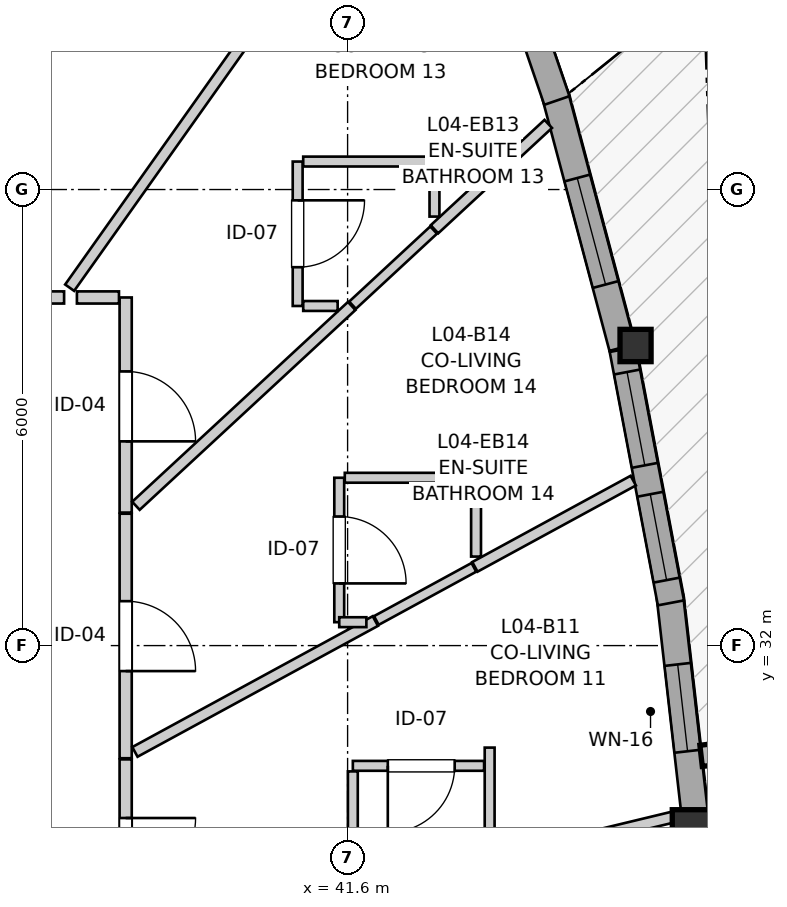
"""IFC4 building model, lengths in metres.
Left out: names, types, materials, properties, quantities, classifications, styles, units other than length and angle.
Written with IfcOpenShell. Run it as: python <this file> out.ifc"""

import sys

from ifc_helpers import new_model, si_unit, direction, frame, frame_2d, origin, origin_2d, place, context, subcontext, project, spatial, rectangle, i_section, extrude, source, transform, mapped, element, fill, save


model = new_model("IFC4")
c1 = context("Model", 3, precision=1e-05, world=origin(), true_north=direction((0.0, 1.0)))
c2 = subcontext(c1, "Body", "Model", "MODEL_VIEW")
j1 = project(units=[si_unit("LENGTHUNIT", "METRE"), si_unit("PLANEANGLEUNIT", "RADIAN")], contexts=[c1])
p1 = place(None, origin())
s1 = spatial("IfcSite", under=j1, at=p1, CompositionType="ELEMENT")
p2 = place(p1, origin())
s2 = spatial("IfcBuilding", under=s1, at=p2, CompositionType="ELEMENT")
p3 = place(p2, frame((0.0, 0.0, 17.4)))
s3 = spatial("IfcBuildingStorey", under=s2, at=p3, CompositionType="ELEMENT", Elevation=17.4)
m1 = source(origin(), c2, "Body", "SweptSolid", [
    extrude(rectangle(XDim=1.05, YDim=1.05, at=origin_2d()), origin(), (0.0, 0.0, 1.0), 2.94),
])
p4 = place(p3, frame((46.397, 29.316, 0.0), z_axis=(0.0, 0.0, 1.0), x_axis=(1.0, 0.0, 0.0)))
e1 = element("IfcColumn", 1, at=p4, inside=s3, PredefinedType="COLUMN", context=c2, shape_type="MappedRepresentation", body=[
    mapped(m1, transform((0.0, 0.0, 0.0), x_axis=(1.0, 0.0, 0.0), y_axis=(0.0, 1.0, 0.0), z_axis=(0.0, 0.0, 1.0), scale=1.0)),
])
m2 = source(origin(), c2, "Body", "SweptSolid", [
    extrude(i_section(OverallWidth=0.409, OverallDepth=0.425, WebThickness=0.03, FlangeThickness=0.048, FilletRadius=0.015, at=origin_2d()), origin(), (0.0, 0.0, 1.0), 2.94),
])
p5 = place(p3, frame((45.389, 35.948, 0.0), z_axis=(0.0, 0.0, 1.0), x_axis=(1.0, 0.0, 0.0)))
e2 = element("IfcColumn", 2, at=p5, inside=s3, PredefinedType="PILASTER", context=c2, shape_type="MappedRepresentation", body=[
    mapped(m2, transform((0.0, 0.0, 0.0), x_axis=(1.0, 0.0, 0.0), y_axis=(0.0, 1.0, 0.0), z_axis=(0.0, 0.0, 1.0), scale=1.0)),
])
p6 = place(p3, frame((46.189, 29.594, 0.0), z_axis=(0.0, 0.0, 1.0), x_axis=(-0.113201797404, 0.99357201705, 0.0)))
e3 = element("IfcWall", 3, at=p6, inside=s3, PredefinedType="SOLIDWALL", context=c2, shape_type="SweptSolid", body=[
    extrude(rectangle(XDim=3.075, YDim=0.35, at=frame_2d((1.538, 0.0))), origin(), (0.0, 0.0, 1.0), 2.42),
])
p7 = place(p6, frame((1.022, 0.0, 0.82)))
e4 = element("IfcOpeningElement", 4, at=p7, cuts=e3, PredefinedType="OPENING", context=c2, shape_type="SweptSolid", body=[
    extrude(rectangle(XDim=1.15, YDim=1.2, at=frame_2d((0.575, 0.6))), frame((0.0, 0.185, 0.0), z_axis=(0.0, -1.0, 0.0), x_axis=(1.0, 0.0, 0.0)), (0.0, 0.0, 1.0), 0.37),
])
p8 = place(p3, frame((45.854, 32.562, 0.0), z_axis=(0.0, 0.0, 1.0), x_axis=(-0.186698837055, 0.982417194598, 0.0)))
e5 = element("IfcWall", 5, at=p8, inside=s3, PredefinedType="SOLIDWALL", context=c2, shape_type="SweptSolid", body=[
    extrude(rectangle(XDim=3.393, YDim=0.35, at=frame_2d((1.697, 0.0))), origin(), (0.0, 0.0, 1.0), 2.42),
])
p9 = place(p8, frame((0.305, 0.0, 0.82)))
e6 = element("IfcOpeningElement", 6, at=p9, cuts=e5, PredefinedType="OPENING", context=c2, shape_type="SweptSolid", body=[
    extrude(rectangle(XDim=1.15, YDim=1.2, at=frame_2d((0.575, 0.6))), frame((0.0, 0.185, 0.0), z_axis=(0.0, -1.0, 0.0), x_axis=(1.0, 0.0, 0.0)), (0.0, 0.0, 1.0), 0.37),
])
p10 = place(p8, frame((1.842, 0.0, 0.82)))
e7 = element("IfcOpeningElement", 7, at=p10, cuts=e5, PredefinedType="OPENING", context=c2, shape_type="SweptSolid", body=[
    extrude(rectangle(XDim=1.25, YDim=1.35, at=frame_2d((0.625, 0.675))), frame((0.0, 0.185, 0.0), z_axis=(0.0, -1.0, 0.0), x_axis=(1.0, 0.0, 0.0)), (0.0, 0.0, 1.0), 0.37),
])
p11 = place(p3, frame((45.214, 35.922, 0.0), z_axis=(0.0, 0.0, 1.0), x_axis=(-0.257081073508, 0.966389839373, 0.0)))
e8 = element("IfcWall", 8, at=p11, inside=s3, PredefinedType="SOLIDWALL", context=c2, shape_type="SweptSolid", body=[
    extrude(rectangle(XDim=3.449, YDim=0.35, at=frame_2d((1.725, 0.0))), origin(), (0.0, 0.0, 1.0), 2.42),
])
p12 = place(p11, frame((0.857, 0.0, 0.82)))
e9 = element("IfcOpeningElement", 9, at=p12, cuts=e8, PredefinedType="OPENING", context=c2, shape_type="SweptSolid", body=[
    extrude(rectangle(XDim=1.45, YDim=1.25, at=frame_2d((0.725, 0.625))), frame((0.0, 0.185, 0.0), z_axis=(0.0, -1.0, 0.0), x_axis=(1.0, 0.0, 0.0)), (0.0, 0.0, 1.0), 0.37),
])
p13 = place(p3, frame((44.353, 39.171, 0.0), z_axis=(0.0, 0.0, 1.0), x_axis=(-0.323604310653, 0.946192501623, 0.0)))
e10 = element("IfcWall", 10, at=p13, inside=s3, PredefinedType="SOLIDWALL", context=c2, shape_type="SweptSolid", body=[
    extrude(rectangle(XDim=3.243, YDim=0.35, at=frame_2d((1.621, 0.0))), origin(), (0.0, 0.0, 1.0), 2.42),
])
p14 = place(p13, frame((0.901, 0.0, 0.82)))
e11 = element("IfcOpeningElement", 11, at=p14, cuts=e10, PredefinedType="OPENING", context=c2, shape_type="SweptSolid", body=[
    extrude(rectangle(XDim=1.45, YDim=1.25, at=frame_2d((0.725, 0.625))), frame((0.0, 0.185, 0.0), z_axis=(0.0, -1.0, 0.0), x_axis=(1.0, 0.0, 0.0)), (0.0, 0.0, 1.0), 0.37),
])
p15 = place(p3, frame((38.68, 33.735, 0.0), z_axis=(0.0, 0.0, 1.0), x_axis=(0.0, -1.0, 0.0)))
e12 = element("IfcWall", 12, at=p15, inside=s3, PredefinedType="PARTITIONING", context=c2, shape_type="SweptSolid", body=[
    extrude(rectangle(XDim=3.217, YDim=0.16, at=frame_2d((1.608, 0.0))), origin(), (0.0, 0.0, 1.0), 2.94),
])
p16 = place(p15, frame((1.15, 0.0, 0.0)))
e13 = element("IfcOpeningElement", 13, at=p16, cuts=e12, PredefinedType="OPENING", context=c2, shape_type="SweptSolid", body=[
    extrude(rectangle(XDim=0.92, YDim=2.1, at=frame_2d((0.46, 1.05))), frame((0.0, 0.09, 0.0), z_axis=(0.0, -1.0, 0.0), x_axis=(1.0, 0.0, 0.0)), (0.0, 0.0, 1.0), 0.18),
])
p17 = place(p3, frame((38.68, 36.58, 0.0), z_axis=(0.0, 0.0, 1.0), x_axis=(0.0, -1.0, 0.0)))
e14 = element("IfcWall", 14, at=p17, inside=s3, PredefinedType="PARTITIONING", context=c2, shape_type="SweptSolid", body=[
    extrude(rectangle(XDim=2.83, YDim=0.16, at=frame_2d((1.415, 0.0))), origin(), (0.0, 0.0, 1.0), 2.94),
])
p18 = place(p17, frame((0.973, 0.0, 0.0)))
e15 = element("IfcOpeningElement", 15, at=p18, cuts=e14, PredefinedType="OPENING", context=c2, shape_type="SweptSolid", body=[
    extrude(rectangle(XDim=0.92, YDim=2.1, at=frame_2d((0.46, 1.05))), frame((0.0, 0.09, 0.0), z_axis=(0.0, -1.0, 0.0), x_axis=(1.0, 0.0, 0.0)), (0.0, 0.0, 1.0), 0.18),
])
p19 = place(p3, frame((38.68, 30.503, 0.0), z_axis=(0.0, 0.0, 1.0), x_axis=(0.0, -1.0, 0.0)))
e16 = element("IfcWall", 16, at=p19, inside=s3, PredefinedType="PARTITIONING", context=c2, shape_type="SweptSolid", body=[
    extrude(rectangle(XDim=2.51, YDim=0.16, at=frame_2d((1.255, 0.0))), origin(), (0.0, 0.0, 1.0), 2.94),
])
p20 = place(p19, frame((0.771, 0.0, 0.0)))
e17 = element("IfcOpeningElement", 17, at=p20, cuts=e16, PredefinedType="OPENING", context=c2, shape_type="SweptSolid", body=[
    extrude(rectangle(XDim=0.92, YDim=2.1, at=frame_2d((0.46, 1.05))), frame((0.0, 0.09, 0.0), z_axis=(0.0, -1.0, 0.0), x_axis=(1.0, 0.0, 0.0)), (0.0, 0.0, 1.0), 0.18),
])
p21 = place(p3, frame((35.773, 36.58, 0.0), z_axis=(0.0, 0.0, 1.0), x_axis=(1.0, 0.0, 0.0)))
e18 = element("IfcWall", 18, at=p21, inside=s3, PredefinedType="PARTITIONING", context=c2, shape_type="SweptSolid", body=[
    extrude(rectangle(XDim=2.097, YDim=0.16, at=frame_2d((1.049, 0.0))), origin(), (0.0, 0.0, 1.0), 2.94),
])
p22 = place(p21, frame((0.588, 0.0, 0.0)))
e19 = element("IfcOpeningElement", 19, at=p22, cuts=e18, PredefinedType="OPENING", context=c2, shape_type="SweptSolid", body=[
    extrude(rectangle(XDim=0.92, YDim=2.1, at=frame_2d((0.46, 1.05))), frame((0.0, 0.09, 0.0), z_axis=(0.0, -1.0, 0.0), x_axis=(1.0, 0.0, 0.0)), (0.0, 0.0, 1.0), 0.18),
])
p23 = place(p3, frame((40.943, 38.368, 0.0), z_axis=(0.0, 0.0, 1.0), x_axis=(0.0, -1.0, 0.0)))
e20 = element("IfcWall", 20, at=p23, inside=s3, PredefinedType="PARTITIONING", context=c2, shape_type="SweptSolid", body=[
    extrude(rectangle(XDim=1.9, YDim=0.13, at=frame_2d((0.95, 0.0))), origin(), (0.0, 0.0, 1.0), 2.94),
])
p24 = place(p23, frame((0.51, 0.0, 0.0)))
e21 = element("IfcOpeningElement", 21, at=p24, cuts=e20, PredefinedType="OPENING", context=c2, shape_type="SweptSolid", body=[
    extrude(rectangle(XDim=0.88, YDim=2.05, at=frame_2d((0.44, 1.025))), frame((0.0, 0.075, 0.0), z_axis=(0.0, -1.0, 0.0), x_axis=(1.0, 0.0, 0.0)), (0.0, 0.0, 1.0), 0.15),
])
p25 = place(p3, frame((41.49, 34.208, 0.0), z_axis=(0.0, 0.0, 1.0), x_axis=(0.0, -1.0, 0.0)))
e22 = element("IfcWall", 22, at=p25, inside=s3, PredefinedType="PARTITIONING", context=c2, shape_type="SweptSolid", body=[
    extrude(rectangle(XDim=1.9, YDim=0.13, at=frame_2d((0.95, 0.0))), origin(), (0.0, 0.0, 1.0), 2.94),
])
p26 = place(p25, frame((0.51, 0.0, 0.0)))
e23 = element("IfcOpeningElement", 23, at=p26, cuts=e22, PredefinedType="OPENING", context=c2, shape_type="SweptSolid", body=[
    extrude(rectangle(XDim=0.88, YDim=2.05, at=frame_2d((0.44, 1.025))), frame((0.0, 0.075, 0.0), z_axis=(0.0, -1.0, 0.0), x_axis=(1.0, 0.0, 0.0)), (0.0, 0.0, 1.0), 0.15),
])
p27 = place(p3, frame((43.396, 30.418, 0.0), z_axis=(0.0, 0.0, 1.0), x_axis=(-1.0, 0.0, 0.0)))
e24 = element("IfcWall", 24, at=p27, inside=s3, PredefinedType="PARTITIONING", context=c2, shape_type="SweptSolid", body=[
    extrude(rectangle(XDim=1.727, YDim=0.13, at=frame_2d((0.864, 0.0))), origin(), (0.0, 0.0, 1.0), 2.94),
])
p28 = place(p27, frame((0.387, 0.0, 0.0)))
e25 = element("IfcOpeningElement", 25, at=p28, cuts=e24, PredefinedType="OPENING", context=c2, shape_type="SweptSolid", body=[
    extrude(rectangle(XDim=0.88, YDim=2.05, at=frame_2d((0.44, 1.025))), frame((0.0, 0.075, 0.0), z_axis=(0.0, -1.0, 0.0), x_axis=(1.0, 0.0, 0.0)), (0.0, 0.0, 1.0), 0.15),
])
p29 = place(p3, frame((34.219, 36.692, 0.0), z_axis=(0.0, 0.0, 1.0), x_axis=(0.340186046968, 0.940358151689, 0.0)))
e26 = element("IfcWall", 26, at=p29, inside=s3, PredefinedType="PARTITIONING", context=c2, shape_type="SweptSolid", body=[
    extrude(rectangle(XDim=11.951, YDim=0.145, at=frame_2d((5.976, 0.0))), origin(), (0.0, 0.0, 1.0), 2.94),
])
p30 = place(p3, frame((35.852, 36.7, 0.0), z_axis=(0.0, 0.0, 1.0), x_axis=(0.457258091214, 0.889334041865, 0.0)))
e27 = element("IfcWall", 27, at=p30, inside=s3, PredefinedType="PARTITIONING", context=c2, shape_type="SweptSolid", body=[
    extrude(rectangle(XDim=11.227, YDim=0.145, at=frame_2d((5.613, 0.0))), origin(), (0.0, 0.0, 1.0), 2.94),
])
p31 = place(p3, frame((37.943, 36.708, 0.0), z_axis=(0.0, 0.0, 1.0), x_axis=(0.578429476704, 0.81573239514, 0.0)))
e28 = element("IfcWall", 28, at=p31, inside=s3, PredefinedType="PARTITIONING", context=c2, shape_type="SweptSolid", body=[
    extrude(rectangle(XDim=8.447, YDim=0.145, at=frame_2d((4.223, 0.0))), origin(), (0.0, 0.0, 1.0), 2.94),
])
p32 = place(p3, frame((38.815, 33.839, 0.0), z_axis=(0.0, 0.0, 1.0), x_axis=(0.733718730688, 0.67945332749, 0.0)))
e29 = element("IfcWall", 29, at=p32, inside=s3, PredefinedType="PARTITIONING", context=c2, shape_type="SweptSolid", body=[
    extrude(rectangle(XDim=3.869, YDim=0.145, at=frame_2d((1.935, 0.0))), origin(), (0.0, 0.0, 1.0), 2.94),
])
p33 = place(p3, frame((38.802, 30.601, 0.0), z_axis=(0.0, 0.0, 1.0), x_axis=(0.878335610987, 0.478044510973, 0.0)))
e30 = element("IfcWall", 30, at=p33, inside=s3, PredefinedType="PARTITIONING", context=c2, shape_type="SweptSolid", body=[
    extrude(rectangle(XDim=3.602, YDim=0.145, at=frame_2d((1.801, 0.0))), origin(), (0.0, 0.0, 1.0), 2.94),
])
p34 = place(p3, frame((43.559, 29.184, 0.0), z_axis=(0.0, 0.0, 1.0), x_axis=(0.972124665715, 0.23446456941, 0.0)))
e31 = element("IfcWall", 31, at=p34, inside=s3, PredefinedType="PARTITIONING", context=c2, shape_type="SweptSolid", body=[
    extrude(rectangle(XDim=2.487, YDim=0.145, at=frame_2d((1.243, 0.0))), origin(), (0.0, 0.0, 1.0), 2.94),
])
p35 = place(p3, frame((43.275, 33.036, 0.0), z_axis=(0.0, 0.0, 1.0), x_axis=(0.878237509553, 0.478224713721, 0.0)))
e32 = element("IfcWall", 32, at=p35, inside=s3, PredefinedType="PARTITIONING", context=c2, shape_type="SweptSolid", body=[
    extrude(rectangle(XDim=2.372, YDim=0.145, at=frame_2d((1.186, 0.0))), origin(), (0.0, 0.0, 1.0), 2.94),
])
p36 = place(p3, frame((42.743, 37.477, 0.0), z_axis=(0.0, 0.0, 1.0), x_axis=(0.73374741774, 0.679422347999, 0.0)))
e33 = element("IfcWall", 33, at=p36, inside=s3, PredefinedType="PARTITIONING", context=c2, shape_type="SweptSolid", body=[
    extrude(rectangle(XDim=2.04, YDim=0.145, at=frame_2d((1.02, 0.0))), origin(), (0.0, 0.0, 1.0), 2.94),
])
p37 = place(p3, frame((41.016, 38.368, 0.0), z_axis=(0.0, 0.0, 1.0), x_axis=(1.0, 0.0, 0.0)))
e34 = element("IfcWall", 34, at=p37, inside=s3, PredefinedType="PARTITIONING", context=c2, shape_type="SweptSolid", body=[
    extrude(rectangle(XDim=1.727, YDim=0.13, at=frame_2d((0.863, 0.0))), origin(), (0.0, 0.0, 1.0), 2.94),
])
p38 = place(p3, frame((41.563, 34.208, 0.0), z_axis=(0.0, 0.0, 1.0), x_axis=(1.0, 0.0, 0.0)))
e35 = element("IfcWall", 35, at=p38, inside=s3, PredefinedType="PARTITIONING", context=c2, shape_type="SweptSolid", body=[
    extrude(rectangle(XDim=1.727, YDim=0.13, at=frame_2d((0.864, 0.0))), origin(), (0.0, 0.0, 1.0), 2.94),
])
p39 = place(p3, frame((41.669, 28.827, 0.0), z_axis=(0.0, 0.0, 1.0), x_axis=(0.0, 1.0, 0.0)))
e36 = element("IfcWall", 36, at=p39, inside=s3, PredefinedType="PARTITIONING", context=c2, shape_type="SweptSolid", body=[
    extrude(rectangle(XDim=1.518, YDim=0.13, at=frame_2d((0.759, 0.0))), origin(), (0.0, 0.0, 1.0), 2.94),
])
p40 = place(p3, frame((41.978, 32.33, 0.0), z_axis=(0.0, 0.0, 1.0), x_axis=(0.878138043068, 0.478407334097, 0.0)))
e37 = element("IfcWall", 37, at=p40, inside=s3, PredefinedType="PARTITIONING", context=c2, shape_type="SweptSolid", body=[
    extrude(rectangle(XDim=1.462, YDim=0.13, at=frame_2d((0.731, 0.0))), origin(), (0.0, 0.0, 1.0), 2.94),
])
p41 = place(p3, frame((41.665, 36.478, 0.0), z_axis=(0.0, 0.0, 1.0), x_axis=(0.733534386117, 0.679652340821, 0.0)))
e38 = element("IfcWall", 38, at=p41, inside=s3, PredefinedType="PARTITIONING", context=c2, shape_type="SweptSolid", body=[
    extrude(rectangle(XDim=1.454, YDim=0.13, at=frame_2d((0.727, 0.0))), origin(), (0.0, 0.0, 1.0), 2.94),
])
p42 = place(p3, frame((43.469, 28.922, 0.0), z_axis=(0.0, 0.0, 1.0), x_axis=(0.0, 1.0, 0.0)))
e39 = element("IfcWall", 39, at=p42, inside=s3, PredefinedType="PARTITIONING", context=c2, shape_type="SweptSolid", body=[
    extrude(rectangle(XDim=1.736, YDim=0.13, at=frame_2d((0.868, 0.0))), origin(), (0.0, 0.0, 1.0), 2.508),
])
p43 = place(p3, frame((43.29, 33.171, 0.0), z_axis=(0.0, 0.0, 1.0), x_axis=(0.0, 1.0, 0.0)))
e40 = element("IfcWall", 40, at=p43, inside=s3, PredefinedType="PARTITIONING", context=c2, shape_type="SweptSolid", body=[
    extrude(rectangle(XDim=0.964, YDim=0.13, at=frame_2d((0.482, 0.0))), origin(), (0.0, 0.0, 1.0), 2.94),
])
p44 = place(p3, frame((42.743, 37.644, 0.0), z_axis=(0.0, 0.0, 1.0), x_axis=(0.0, 1.0, 0.0)))
e41 = element("IfcWall", 41, at=p44, inside=s3, PredefinedType="PARTITIONING", context=c2, shape_type="SweptSolid", body=[
    extrude(rectangle(XDim=0.651, YDim=0.13, at=frame_2d((0.325, 0.0))), origin(), (0.0, 0.0, 1.0), 2.94),
])
p45 = place(p3, frame((38.039, 36.58, 0.0), z_axis=(0.0, 0.0, 1.0), x_axis=(1.0, 0.0, 0.0)))
e42 = element("IfcWall", 42, at=p45, inside=s3, PredefinedType="PARTITIONING", context=c2, shape_type="SweptSolid", body=[
    extrude(rectangle(XDim=0.553, YDim=0.16, at=frame_2d((0.277, 0.0))), origin(), (0.0, 0.0, 1.0), 2.94),
])
p46 = place(p3, frame((41.016, 36.468, 0.0), z_axis=(0.0, 0.0, 1.0), x_axis=(1.0, 0.0, 0.0)))
e43 = element("IfcWall", 43, at=p46, inside=s3, PredefinedType="PARTITIONING", context=c2, shape_type="SweptSolid", body=[
    extrude(rectangle(XDim=0.453, YDim=0.13, at=frame_2d((0.227, 0.0))), origin(), (0.0, 0.0, 1.0), 2.94),
])
p47 = place(p3, frame((41.49, 32.308, 0.0), z_axis=(0.0, 0.0, 1.0), x_axis=(1.0, 0.0, 0.0)))
e44 = element("IfcWall", 44, at=p47, inside=s3, PredefinedType="PARTITIONING", context=c2, shape_type="SweptSolid", body=[
    extrude(rectangle(XDim=0.357, YDim=0.13, at=frame_2d((0.178, 0.0))), origin(), (0.0, 0.0, 1.0), 2.94),
])
m3 = source(origin(), c2, "Body", "SweptSolid", [
    extrude(rectangle(XDim=1.15, YDim=1.2, at=frame_2d((0.575, 0.6))), frame((0.0, 0.03, 0.0), z_axis=(0.0, -1.0, 0.0), x_axis=(1.0, 0.0, 0.0)), (0.0, 0.0, 1.0), 0.06),
])
p48 = place(p7, origin())
e45 = element("IfcWindow", 45, at=p48, inside=s3, PartitioningType="SINGLE_PANEL", PredefinedType="WINDOW", context=c2, shape_type="MappedRepresentation", body=[
    mapped(m3, transform((0.0, 0.0, 0.0), x_axis=(1.0, 0.0, 0.0), y_axis=(0.0, 1.0, 0.0), z_axis=(0.0, 0.0, 1.0), scale=1.0)),
])
fill(e4, e45)
p49 = place(p9, origin())
e46 = element("IfcWindow", 46, at=p49, inside=s3, PartitioningType="SINGLE_PANEL", PredefinedType="WINDOW", context=c2, shape_type="MappedRepresentation", body=[
    mapped(m3, transform((0.0, 0.0, 0.0), x_axis=(1.0, 0.0, 0.0), y_axis=(0.0, 1.0, 0.0), z_axis=(0.0, 0.0, 1.0), scale=1.0)),
])
fill(e6, e46)
m4 = source(origin(), c2, "Body", "SweptSolid", [
    extrude(rectangle(XDim=1.25, YDim=1.35, at=frame_2d((0.625, 0.675))), frame((0.0, 0.03, 0.0), z_axis=(0.0, -1.0, 0.0), x_axis=(1.0, 0.0, 0.0)), (0.0, 0.0, 1.0), 0.06),
])
p50 = place(p10, origin())
e47 = element("IfcWindow", 47, at=p50, inside=s3, PartitioningType="SINGLE_PANEL", PredefinedType="WINDOW", context=c2, shape_type="MappedRepresentation", body=[
    mapped(m4, transform((0.0, 0.0, 0.0), x_axis=(1.0, 0.0, 0.0), y_axis=(0.0, 1.0, 0.0), z_axis=(0.0, 0.0, 1.0), scale=1.0)),
])
fill(e7, e47)
m5 = source(origin(), c2, "Body", "SweptSolid", [
    extrude(rectangle(XDim=1.45, YDim=1.25, at=frame_2d((0.725, 0.625))), frame((0.0, 0.03, 0.0), z_axis=(0.0, -1.0, 0.0), x_axis=(1.0, 0.0, 0.0)), (0.0, 0.0, 1.0), 0.06),
])
p51 = place(p12, origin())
e48 = element("IfcWindow", 48, at=p51, inside=s3, PartitioningType="SINGLE_PANEL", PredefinedType="WINDOW", context=c2, shape_type="MappedRepresentation", body=[
    mapped(m5, transform((0.0, 0.0, 0.0), x_axis=(1.0, 0.0, 0.0), y_axis=(0.0, 1.0, 0.0), z_axis=(0.0, 0.0, 1.0), scale=1.0)),
])
fill(e9, e48)
m6 = source(origin(), c2, "Body", "SweptSolid", [
    extrude(rectangle(XDim=0.92, YDim=2.1, at=frame_2d((0.46, 1.05))), frame((0.0, 0.025, 0.0), z_axis=(0.0, -1.0, 0.0), x_axis=(1.0, 0.0, 0.0)), (0.0, 0.0, 1.0), 0.05),
])
p52 = place(p16, origin())
e49 = element("IfcDoor", 49, at=p52, inside=s3, OperationType="SINGLE_SWING_RIGHT", PredefinedType="DOOR", context=c2, shape_type="MappedRepresentation", body=[
    mapped(m6, transform((0.0, 0.0, 0.0), x_axis=(1.0, 0.0, 0.0), y_axis=(0.0, 1.0, 0.0), z_axis=(0.0, 0.0, 1.0), scale=1.0)),
])
fill(e13, e49)
p53 = place(p18, origin())
e50 = element("IfcDoor", 50, at=p53, inside=s3, OperationType="SINGLE_SWING_RIGHT", PredefinedType="DOOR", context=c2, shape_type="MappedRepresentation", body=[
    mapped(m6, transform((0.0, 0.0, 0.0), x_axis=(1.0, 0.0, 0.0), y_axis=(0.0, 1.0, 0.0), z_axis=(0.0, 0.0, 1.0), scale=1.0)),
])
fill(e15, e50)
p54 = place(p20, origin())
e51 = element("IfcDoor", 51, at=p54, inside=s3, OperationType="SINGLE_SWING_LEFT", PredefinedType="DOOR", context=c2, shape_type="MappedRepresentation", body=[
    mapped(m6, transform((0.0, 0.0, 0.0), x_axis=(1.0, 0.0, 0.0), y_axis=(0.0, 1.0, 0.0), z_axis=(0.0, 0.0, 1.0), scale=1.0)),
])
fill(e17, e51)
m7 = source(origin(), c2, "Body", "SweptSolid", [
    extrude(rectangle(XDim=0.88, YDim=2.05, at=frame_2d((0.44, 1.025))), frame((0.0, 0.025, 0.0), z_axis=(0.0, -1.0, 0.0), x_axis=(1.0, 0.0, 0.0)), (0.0, 0.0, 1.0), 0.05),
])
p55 = place(p24, origin())
e52 = element("IfcDoor", 52, at=p55, inside=s3, OperationType="SINGLE_SWING_LEFT", PredefinedType="DOOR", context=c2, shape_type="MappedRepresentation", body=[
    mapped(m7, transform((0.0, 0.0, 0.0), x_axis=(1.0, 0.0, 0.0), y_axis=(0.0, 1.0, 0.0), z_axis=(0.0, 0.0, 1.0), scale=1.0)),
])
fill(e21, e52)
p56 = place(p26, origin())
e53 = element("IfcDoor", 53, at=p56, inside=s3, OperationType="SINGLE_SWING_RIGHT", PredefinedType="DOOR", context=c2, shape_type="MappedRepresentation", body=[
    mapped(m7, transform((0.0, 0.0, 0.0), x_axis=(1.0, 0.0, 0.0), y_axis=(0.0, 1.0, 0.0), z_axis=(0.0, 0.0, 1.0), scale=1.0)),
])
fill(e23, e53)
p57 = place(p28, origin())
e54 = element("IfcDoor", 54, at=p57, inside=s3, OperationType="SINGLE_SWING_RIGHT", PredefinedType="DOOR", context=c2, shape_type="MappedRepresentation", body=[
    mapped(m7, transform((0.0, 0.0, 0.0), x_axis=(1.0, 0.0, 0.0), y_axis=(0.0, 1.0, 0.0), z_axis=(0.0, 0.0, 1.0), scale=1.0)),
])
fill(e25, e54)
save(model, sys.argv[1])
